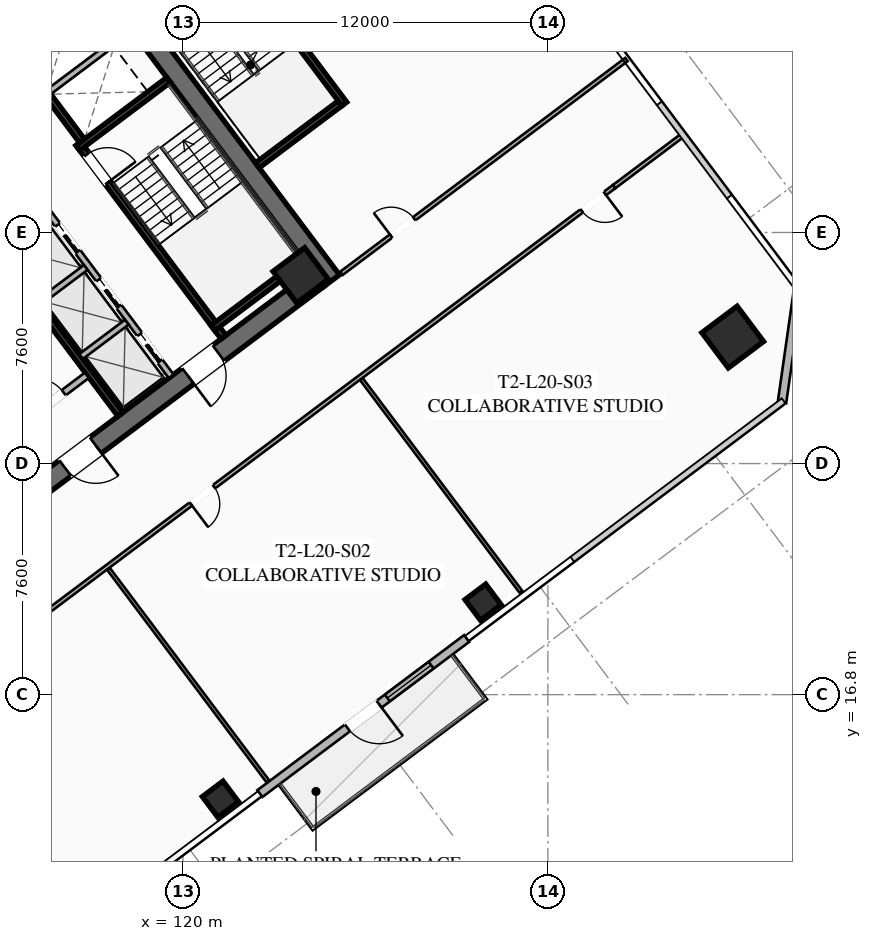
"""IFC4 building model, lengths in metres.
Left out: names, types, materials, properties, quantities, classifications, styles, units other than length and angle.
Written with IfcOpenShell. Run it as: python <this file> out.ifc"""

import sys

from ifc_helpers import new_model, si_unit, direction, frame, frame_2d, origin, origin_2d, place, context, subcontext, project, spatial, rectangle, hollow_rectangle, extrude, element, fill, save


model = new_model("IFC4")
c1 = context("Model", 3, precision=1e-05, world=origin(), true_north=direction((0.0, 1.0)))
c2 = subcontext(c1, "Body", "Model", "MODEL_VIEW")
j1 = project(units=[si_unit("LENGTHUNIT", "METRE"), si_unit("PLANEANGLEUNIT", "RADIAN")], contexts=[c1])
p1 = place(None, origin())
s1 = spatial("IfcSite", under=j1, at=p1, CompositionType="ELEMENT")
p2 = place(p1, origin())
s2 = spatial("IfcBuilding", under=s1, at=p2, CompositionType="ELEMENT")
p3 = place(p2, frame((0.0, 0.0, 77.85)))
s3 = spatial("IfcBuildingStorey", under=s2, at=p3, CompositionType="ELEMENT", Elevation=77.85)
p4 = place(p3, frame((115.524, 42.893, 0.0), z_axis=(0.0, 0.0, 1.0), x_axis=(0.600005007985, -0.799996243986, 0.0)))
e1 = element("IfcWall", 1, at=p4, inside=s3, PredefinedType="SHEAR", context=c2, shape_type="SweptSolid", body=[
    extrude(rectangle(XDim=15.6, YDim=0.65, at=frame_2d((7.8, 0.0))), origin(), (0.0, 0.0, 1.0), 3.55),
])
p5 = place(p3, frame((124.429, 30.478, 0.0), z_axis=(0.0, 0.0, 1.0), x_axis=(-0.799998028465, -0.600002628705, 0.0)))
e2 = element("IfcWall", 2, at=p5, inside=s3, PredefinedType="SHEAR", context=c2, shape_type="SweptSolid", body=[
    extrude(rectangle(XDim=14.86, YDim=0.65, at=frame_2d((7.43, 0.0))), origin(), (0.0, 0.0, 1.0), 3.55),
])
p6 = place(p5, frame((9.13, 0.0, 0.0)))
e3 = element("IfcOpeningElement", 3, at=p6, cuts=e2, PredefinedType="OPENING", context=c2, shape_type="SweptSolid", body=[
    extrude(rectangle(XDim=1.25, YDim=2.25, at=frame_2d((0.625, 1.125))), frame((0.0, 0.335, 0.0), z_axis=(0.0, -1.0, 0.0), x_axis=(1.0, 0.0, 0.0)), (0.0, 0.0, 1.0), 0.67),
])
p7 = place(p5, frame((4.08, 0.0, 0.0)))
e4 = element("IfcOpeningElement", 4, at=p7, cuts=e2, PredefinedType="OPENING", context=c2, shape_type="SweptSolid", body=[
    extrude(rectangle(XDim=1.25, YDim=2.25, at=frame_2d((0.625, 1.125))), frame((0.0, 0.335, 0.0), z_axis=(0.0, -1.0, 0.0), x_axis=(1.0, 0.0, 0.0)), (0.0, 0.0, 1.0), 0.67),
])
p8 = place(p3, frame((123.87, 30.59, 0.0), z_axis=(0.0, 0.0, 1.0), x_axis=(0.799999996291, 0.600000004945, 0.0)))
e5 = element("IfcColumn", 5, at=p8, inside=s3, PredefinedType="COLUMN", context=c2, shape_type="SweptSolid", body=[
    extrude(hollow_rectangle(XDim=1.3, YDim=1.3, WallThickness=0.05, at=origin_2d()), origin(), (0.0, 0.0, 1.0), 3.35),
])
p9 = place(p3, frame((138.08, 28.56, 0.0), z_axis=(0.0, 0.0, 1.0), x_axis=(0.799999996291, 0.600000004945, 0.0)))
e6 = element("IfcColumn", 6, at=p9, inside=s3, PredefinedType="COLUMN", context=c2, shape_type="SweptSolid", body=[
    extrude(hollow_rectangle(XDim=1.45, YDim=1.45, WallThickness=0.055, at=origin_2d()), origin(), (0.0, 0.0, 1.0), 3.35),
])
for number, where, z_axis, x_axis in (
    (7, (121.23, 13.36, 0.0), (0.0, 0.0, 1.0), (0.8, 0.6, 0.0)),
    (8, (129.87, 19.84, 0.0), (0.0, 0.0, 1.0), (0.8, 0.6, 0.0)),
):
    element("IfcColumn", number, at=place(p3, frame(where, z_axis=z_axis, x_axis=x_axis)), inside=s3, PredefinedType="COLUMN", context=c2, shape_type="SweptSolid", body=[
        extrude(hollow_rectangle(XDim=0.85, YDim=0.85, WallThickness=0.035, at=origin_2d()), origin(), (0.0, 0.0, 1.0), 3.35),
    ])
p10 = place(p3, frame((129.328, 18.646, 0.0), z_axis=(0.0, 0.0, 1.0), x_axis=(-0.799986212866, -0.600018382406, 0.0)))
e9 = element("IfcWall", 9, at=p10, inside=s3, PredefinedType="SOLIDWALL", context=c2, shape_type="SweptSolid", body=[
    extrude(rectangle(XDim=8.5, YDim=0.28, at=frame_2d((4.25, 0.0))), origin(), (0.0, 0.0, 1.0), 3.35),
])
p11 = place(p10, frame((3.6, 0.0, 0.0)))
e10 = element("IfcOpeningElement", 10, at=p11, cuts=e9, PredefinedType="OPENING", context=c2, shape_type="SweptSolid", body=[
    extrude(rectangle(XDim=1.3, YDim=2.15, at=frame_2d((0.65, 1.075))), frame((0.0, 0.15, 0.0), z_axis=(0.0, -1.0, 0.0), x_axis=(1.0, 0.0, 0.0)), (0.0, 0.0, 1.0), 0.3),
])
p12 = place(p10, frame((1.46, 0.0, 0.85)))
e11 = element("IfcOpeningElement", 11, at=p12, cuts=e9, PredefinedType="OPENING", context=c2, shape_type="SweptSolid", body=[
    extrude(rectangle(XDim=1.8, YDim=1.92, at=frame_2d((0.9, 0.96))), frame((0.0, 0.15, 0.0), z_axis=(0.0, -1.0, 0.0), x_axis=(1.0, 0.0, 0.0)), (0.0, 0.0, 1.0), 0.3),
])
p13 = place(p3, frame((140.24, 30.18, 0.0), z_axis=(0.0, 0.0, 1.0), x_axis=(-0.141430307517, -0.989948214866, 0.0)))
e12 = element("IfcWall", 12, at=p13, inside=s3, PredefinedType="SOLIDWALL", context=c2, shape_type="SweptSolid", body=[
    extrude(rectangle(XDim=3.818, YDim=0.28, at=frame_2d((1.909, 0.0))), origin(), (0.0, 0.0, 1.0), 3.35),
])
p14 = place(p3, frame((116.56, 34.92, 0.0), z_axis=(0.0, 0.0, 1.0), x_axis=(0.600009827119, -0.799992629566, 0.0)))
e13 = element("IfcWall", 13, at=p14, inside=s3, PredefinedType="SHEAR", context=c2, shape_type="SweptSolid", body=[
    extrude(rectangle(XDim=7.95, YDim=0.2, at=frame_2d((3.975, 0.0))), origin(), (0.0, 0.0, 1.0), 3.35),
])
p15 = place(p14, frame((0.45, 0.0, 0.0)))
e14 = element("IfcOpeningElement", 14, at=p15, cuts=e13, PredefinedType="OPENING", context=c2, shape_type="SweptSolid", body=[
    extrude(rectangle(XDim=1.15, YDim=2.2, at=frame_2d((0.575, 1.1))), frame((0.0, 0.11, 0.0), z_axis=(0.0, -1.0, 0.0), x_axis=(1.0, 0.0, 0.0)), (0.0, 0.0, 1.0), 0.22),
])
for number, where, z_axis, x_axis in (
    (15, (116.54, 34.78, 0.0), (0.0, 0.0, 1.0), (0.8, 0.6, 0.0)),
    (16, (120.98, 28.86, 0.0), (0.0, 0.0, 1.0), (0.8, 0.6, 0.0)),
):
    element("IfcWall", number, at=place(p3, frame(where, z_axis=z_axis, x_axis=x_axis)), inside=s3, PredefinedType="SHEAR", context=c2, shape_type="SweptSolid", body=[
        extrude(rectangle(XDim=3.73, YDim=0.2, at=frame_2d((1.865, 0.0))), origin(), (0.0, 0.0, 1.0), 3.35),
    ])
p16 = place(p3, frame((117.938, 26.016, 0.0), z_axis=(0.0, 0.0, 1.0), x_axis=(-0.600005463273, 0.799995902516, 0.0)))
e17 = element("IfcWall", 17, at=p16, inside=s3, PredefinedType="SHEAR", context=c2, shape_type="SweptSolid", body=[
    extrude(rectangle(XDim=14.3, YDim=0.2, at=frame_2d((7.15, 0.0))), origin(), (0.0, 0.0, 1.0), 3.35),
])
p17 = place(p3, frame((114.316, 25.412, 0.0), z_axis=(0.0, 0.0, 1.0), x_axis=(0.800018601094, 0.59997519774, 0.0)))
e18 = element("IfcWall", 18, at=p17, inside=s3, PredefinedType="SOLIDWALL", context=c2, shape_type="SweptSolid", body=[
    extrude(rectangle(XDim=3.15, YDim=0.22, at=frame_2d((1.575, 0.0))), origin(), (0.0, 0.0, 1.0), 2.703),
])
p18 = place(p17, frame((0.95, 0.0, 0.0)))
e19 = element("IfcOpeningElement", 19, at=p18, cuts=e18, PredefinedType="OPENING", context=c2, shape_type="SweptSolid", body=[
    extrude(rectangle(XDim=1.25, YDim=2.25, at=frame_2d((0.625, 1.125))), frame((0.0, 0.12, 0.0), z_axis=(0.0, -1.0, 0.0), x_axis=(1.0, 0.0, 0.0)), (0.0, 0.0, 1.0), 0.24),
])
p19 = place(p3, frame((112.87, 40.09, 0.0), z_axis=(0.0, 0.0, 1.0), x_axis=(0.599975393228, -0.800018454488, 0.0)))
e20 = element("IfcWall", 20, at=p19, inside=s3, PredefinedType="SHEAR", context=c2, shape_type="SweptSolid", body=[
    extrude(rectangle(XDim=6.35, YDim=0.2, at=frame_2d((3.175, 0.0))), origin(), (0.0, 0.0, 1.0), 3.35),
])
p20 = place(p3, frame((115.59, 36.63, 0.0), z_axis=(0.0, 0.0, 1.0), x_axis=(0.799973995579, 0.600034670996, 0.0)))
e21 = element("IfcWall", 21, at=p20, inside=s3, PredefinedType="SOLIDWALL", context=c2, shape_type="SweptSolid", body=[
    extrude(rectangle(XDim=3.38, YDim=0.2, at=frame_2d((1.69, 0.0))), origin(), (0.0, 0.0, 1.0), 3.35),
])
p21 = place(p3, frame((119.61, 27.27, 0.0), z_axis=(0.0, 0.0, 1.0), x_axis=(-0.600011488909, 0.79999138319, 0.0)))
e22 = element("IfcWall", 22, at=p21, inside=s3, PredefinedType="SOLIDWALL", context=c2, shape_type="SweptSolid", body=[
    extrude(rectangle(XDim=6.8, YDim=0.2, at=frame_2d((3.4, 0.0))), origin(), (0.0, 0.0, 1.0), 3.35),
])
p22 = place(p21, frame((0.625, 0.0, 0.0)))
e23 = element("IfcOpeningElement", 23, at=p22, cuts=e22, PredefinedType="OPENING", context=c2, shape_type="SweptSolid", body=[
    extrude(rectangle(XDim=1.1, YDim=2.2, at=frame_2d((0.55, 1.1))), frame((0.0, 0.11, 0.0), z_axis=(0.0, -1.0, 0.0), x_axis=(1.0, 0.0, 0.0)), (0.0, 0.0, 1.0), 0.22),
])
p23 = place(p21, frame((2.875, 0.0, 0.0)))
e24 = element("IfcOpeningElement", 24, at=p23, cuts=e22, PredefinedType="OPENING", context=c2, shape_type="SweptSolid", body=[
    extrude(rectangle(XDim=1.1, YDim=2.2, at=frame_2d((0.55, 1.1))), frame((0.0, 0.11, 0.0), z_axis=(0.0, -1.0, 0.0), x_axis=(1.0, 0.0, 0.0)), (0.0, 0.0, 1.0), 0.22),
])
p24 = place(p21, frame((5.125, 0.0, 0.0)))
e25 = element("IfcOpeningElement", 25, at=p24, cuts=e22, PredefinedType="OPENING", context=c2, shape_type="SweptSolid", body=[
    extrude(rectangle(XDim=1.1, YDim=2.2, at=frame_2d((0.55, 1.1))), frame((0.0, 0.11, 0.0), z_axis=(0.0, -1.0, 0.0), x_axis=(1.0, 0.0, 0.0)), (0.0, 0.0, 1.0), 0.22),
])
p25 = place(p3, frame((116.646, 27.922, 0.0), z_axis=(0.0, 0.0, 1.0), x_axis=(0.8, 0.6, 0.0)))
e26 = element("IfcWall", 26, at=p25, inside=s3, PredefinedType="SOLIDWALL", context=c2, shape_type="SweptSolid", body=[
    extrude(rectangle(XDim=1.88, YDim=0.2, at=frame_2d((0.94, 0.0))), origin(), (0.0, 0.0, 1.0), 3.35),
])
p26 = place(p3, frame((115.296, 29.722, 0.0), z_axis=(0.0, 0.0, 1.0), x_axis=(0.799984418148, 0.600020775241, 0.0)))
e27 = element("IfcWall", 27, at=p26, inside=s3, PredefinedType="SOLIDWALL", context=c2, shape_type="SweptSolid", body=[
    extrude(rectangle(XDim=1.88, YDim=0.2, at=frame_2d((0.94, 0.0))), origin(), (0.0, 0.0, 1.0), 3.35),
])
p27 = place(p3, frame((125.304, 36.228, 0.0), z_axis=(0.0, 0.0, 1.0), x_axis=(-0.59998851072, 0.800008616831, 0.0)))
e28 = element("IfcWall", 28, at=p27, inside=s3, PredefinedType="SHEAR", context=c2, shape_type="SweptSolid", body=[
    extrude(rectangle(XDim=6.8, YDim=0.2, at=frame_2d((3.4, 0.0))), origin(), (0.0, 0.0, 1.0), 3.35),
])
p28 = place(p3, frame((122.444, 34.208, 0.0), z_axis=(0.0, 0.0, 1.0), x_axis=(0.79999138319, 0.600011488909, 0.0)))
e29 = element("IfcWall", 29, at=p28, inside=s3, PredefinedType="SHEAR", context=c2, shape_type="SweptSolid", body=[
    extrude(rectangle(XDim=3.4, YDim=0.2, at=frame_2d((1.7, 0.0))), origin(), (0.0, 0.0, 1.0), 3.35),
])
p29 = place(p3, frame((98.516, 34.012, 0.0), z_axis=(0.0, 0.0, 1.0), x_axis=(0.8, 0.6, 0.0)))
e30 = element("IfcWall", 30, at=p29, inside=s3, PredefinedType="PARTITIONING", context=c2, shape_type="SweptSolid", body=[
    extrude(rectangle(XDim=28.23, YDim=0.135, at=frame_2d((14.115, 0.0))), origin(), (0.0, 0.0, 1.0), 2.703),
])
p30 = place(p29, frame((0.3, 0.0, 0.0)))
e31 = element("IfcOpeningElement", 31, at=p30, cuts=e30, PredefinedType="OPENING", context=c2, shape_type="SweptSolid", body=[
    extrude(rectangle(XDim=0.95, YDim=2.05, at=frame_2d((0.475, 1.025))), frame((0.0, 0.077, 0.0), z_axis=(0.0, -1.0, 0.0), x_axis=(1.0, 0.0, 0.0)), (0.0, 0.0, 1.0), 0.155),
])
p31 = place(p29, frame((11.004, 0.0, 0.0)))
e32 = element("IfcOpeningElement", 32, at=p31, cuts=e30, PredefinedType="OPENING", context=c2, shape_type="SweptSolid", body=[
    extrude(rectangle(XDim=0.95, YDim=2.05, at=frame_2d((0.475, 1.025))), frame((0.0, 0.077, 0.0), z_axis=(0.0, -1.0, 0.0), x_axis=(1.0, 0.0, 0.0)), (0.0, 0.0, 1.0), 0.155),
])
p32 = place(p29, frame((26.98, 0.0, 0.0)))
e33 = element("IfcOpeningElement", 33, at=p32, cuts=e30, PredefinedType="OPENING", context=c2, shape_type="SweptSolid", body=[
    extrude(rectangle(XDim=0.95, YDim=2.05, at=frame_2d((0.475, 1.025))), frame((0.0, 0.077, 0.0), z_axis=(0.0, -1.0, 0.0), x_axis=(1.0, 0.0, 0.0)), (0.0, 0.0, 1.0), 0.155),
])
p33 = place(p3, frame((134.18, 33.51, 0.0), z_axis=(0.0, 0.0, 1.0), x_axis=(-0.8, -0.6, 0.0)))
e34 = element("IfcWall", 34, at=p33, inside=s3, PredefinedType="PARTITIONING", context=c2, shape_type="SweptSolid", body=[
    extrude(rectangle(XDim=28.23, YDim=0.135, at=frame_2d((14.115, 0.0))), origin(), (0.0, 0.0, 1.0), 2.703),
])
p34 = place(p33, frame((26.9, 0.0, 0.0)))
e35 = element("IfcOpeningElement", 35, at=p34, cuts=e34, PredefinedType="OPENING", context=c2, shape_type="SweptSolid", body=[
    extrude(rectangle(XDim=0.95, YDim=2.05, at=frame_2d((0.475, 1.025))), frame((0.0, 0.077, 0.0), z_axis=(0.0, -1.0, 0.0), x_axis=(1.0, 0.0, 0.0)), (0.0, 0.0, 1.0), 0.155),
])
p35 = place(p33, frame((16.453, 0.0, 0.0)))
e36 = element("IfcOpeningElement", 36, at=p35, cuts=e34, PredefinedType="OPENING", context=c2, shape_type="SweptSolid", body=[
    extrude(rectangle(XDim=0.95, YDim=2.05, at=frame_2d((0.475, 1.025))), frame((0.0, 0.077, 0.0), z_axis=(0.0, -1.0, 0.0), x_axis=(1.0, 0.0, 0.0)), (0.0, 0.0, 1.0), 0.155),
])
p36 = place(p33, frame((0.38, 0.0, 0.0)))
e37 = element("IfcOpeningElement", 37, at=p36, cuts=e34, PredefinedType="OPENING", context=c2, shape_type="SweptSolid", body=[
    extrude(rectangle(XDim=0.95, YDim=2.05, at=frame_2d((0.475, 1.025))), frame((0.0, 0.077, 0.0), z_axis=(0.0, -1.0, 0.0), x_axis=(1.0, 0.0, 0.0)), (0.0, 0.0, 1.0), 0.155),
])
p37 = place(p3, frame((134.18, 33.51, 0.0), z_axis=(0.0, 0.0, 1.0), x_axis=(0.8000207031, 0.599972394874, 0.0)))
e38 = element("IfcWall", 38, at=p37, inside=s3, PredefinedType="PARTITIONING", context=c2, shape_type="SweptSolid", body=[
    extrude(rectangle(XDim=2.83, YDim=0.135, at=frame_2d((1.415, 0.0))), origin(), (0.0, 0.0, 1.0), 2.703),
])
for number, where, z_axis, x_axis in (
    (39, (122.798, 13.936, 0.0), (0.0, 0.0, 1.0), (-0.6, 0.8, 0.0)),
    (40, (131.118, 20.176, 0.0), (0.0, 0.0, 1.0), (-0.6, 0.8, 0.0)),
):
    element("IfcWall", number, at=place(p3, frame(where, z_axis=z_axis, x_axis=x_axis)), inside=s3, PredefinedType="PARTITIONING", context=c2, shape_type="SweptSolid", body=[
        extrude(rectangle(XDim=8.75, YDim=0.11, at=frame_2d((4.375, 0.0))), origin(), (0.0, 0.0, 1.0), 2.703),
    ])
p38 = place(p3, frame((125.208, 30.656, 0.0), z_axis=(0.0, 0.0, 1.0), x_axis=(0.8, 0.6, 0.0)))
e41 = element("IfcWall", 41, at=p38, inside=s3, PredefinedType="PARTITIONING", context=c2, shape_type="SweptSolid", body=[
    extrude(rectangle(XDim=11.72, YDim=0.135, at=frame_2d((5.86, 0.0))), origin(), (0.0, 0.0, 1.0), 2.703),
])
p39 = place(p38, frame((2.045, 0.0, 0.0)))
e42 = element("IfcOpeningElement", 42, at=p39, cuts=e41, PredefinedType="OPENING", context=c2, shape_type="SweptSolid", body=[
    extrude(rectangle(XDim=0.95, YDim=2.05, at=frame_2d((0.475, 1.025))), frame((0.0, 0.077, 0.0), z_axis=(0.0, -1.0, 0.0), x_axis=(1.0, 0.0, 0.0)), (0.0, 0.0, 1.0), 0.155),
])
p40 = place(p11, origin())
e43 = element("IfcDoor", 43, at=p40, inside=s3, OperationType="SINGLE_SWING_LEFT", PredefinedType="DOOR", context=c2, shape_type="SweptSolid", body=[
    extrude(rectangle(XDim=1.3, YDim=2.15, at=frame_2d((0.65, 1.075))), frame((0.0, 0.025, 0.0), z_axis=(0.0, -1.0, 0.0), x_axis=(1.0, 0.0, 0.0)), (0.0, 0.0, 1.0), 0.05),
])
fill(e10, e43)
p41 = place(p12, origin())
e44 = element("IfcWindow", 44, at=p41, inside=s3, PartitioningType="SINGLE_PANEL", PredefinedType="WINDOW", context=c2, shape_type="SweptSolid", body=[
    extrude(rectangle(XDim=1.8, YDim=1.92, at=frame_2d((0.9, 0.96))), frame((0.0, 0.03, 0.0), z_axis=(0.0, -1.0, 0.0), x_axis=(1.0, 0.0, 0.0)), (0.0, 0.0, 1.0), 0.06),
])
fill(e11, e44)
p42 = place(p6, origin())
e45 = element("IfcDoor", 45, at=p42, inside=s3, OperationType="SINGLE_SWING_LEFT", PredefinedType="DOOR", context=c2, shape_type="SweptSolid", body=[
    extrude(rectangle(XDim=1.25, YDim=2.25, at=frame_2d((0.625, 1.125))), frame((0.0, 0.025, 0.0), z_axis=(0.0, -1.0, 0.0), x_axis=(1.0, 0.0, 0.0)), (0.0, 0.0, 1.0), 0.05),
])
fill(e3, e45)
p43 = place(p7, origin())
e46 = element("IfcDoor", 46, at=p43, inside=s3, OperationType="SINGLE_SWING_RIGHT", PredefinedType="DOOR", context=c2, shape_type="SweptSolid", body=[
    extrude(rectangle(XDim=1.25, YDim=2.25, at=frame_2d((0.625, 1.125))), frame((0.0, 0.025, 0.0), z_axis=(0.0, -1.0, 0.0), x_axis=(1.0, 0.0, 0.0)), (0.0, 0.0, 1.0), 0.05),
])
fill(e4, e46)
p44 = place(p15, origin())
e47 = element("IfcDoor", 47, at=p44, inside=s3, OperationType="SINGLE_SWING_RIGHT", PredefinedType="DOOR", context=c2, shape_type="SweptSolid", body=[
    extrude(rectangle(XDim=1.15, YDim=2.2, at=frame_2d((0.575, 1.1))), frame((0.0, 0.025, 0.0), z_axis=(0.0, -1.0, 0.0), x_axis=(1.0, 0.0, 0.0)), (0.0, 0.0, 1.0), 0.05),
])
fill(e14, e47)
p45 = place(p18, origin())
e48 = element("IfcDoor", 48, at=p45, inside=s3, OperationType="SINGLE_SWING_LEFT", PredefinedType="DOOR", context=c2, shape_type="SweptSolid", body=[
    extrude(rectangle(XDim=1.25, YDim=2.25, at=frame_2d((0.625, 1.125))), frame((0.0, 0.025, 0.0), z_axis=(0.0, -1.0, 0.0), x_axis=(1.0, 0.0, 0.0)), (0.0, 0.0, 1.0), 0.05),
])
fill(e19, e48)
p46 = place(p35, origin())
e49 = element("IfcDoor", 49, at=p46, inside=s3, OperationType="SINGLE_SWING_RIGHT", PredefinedType="DOOR", context=c2, shape_type="SweptSolid", body=[
    extrude(rectangle(XDim=0.95, YDim=2.05, at=frame_2d((0.475, 1.025))), frame((0.0, 0.025, 0.0), z_axis=(0.0, -1.0, 0.0), x_axis=(1.0, 0.0, 0.0)), (0.0, 0.0, 1.0), 0.05),
])
fill(e36, e49)
p47 = place(p36, origin())
e50 = element("IfcDoor", 50, at=p47, inside=s3, OperationType="SINGLE_SWING_LEFT", PredefinedType="DOOR", context=c2, shape_type="SweptSolid", body=[
    extrude(rectangle(XDim=0.95, YDim=2.05, at=frame_2d((0.475, 1.025))), frame((0.0, 0.025, 0.0), z_axis=(0.0, -1.0, 0.0), x_axis=(1.0, 0.0, 0.0)), (0.0, 0.0, 1.0), 0.05),
])
fill(e37, e50)
p48 = place(p39, origin())
e51 = element("IfcDoor", 51, at=p48, inside=s3, OperationType="SINGLE_SWING_LEFT", PredefinedType="DOOR", context=c2, shape_type="SweptSolid", body=[
    extrude(rectangle(XDim=0.95, YDim=2.05, at=frame_2d((0.475, 1.025))), frame((0.0, 0.025, 0.0), z_axis=(0.0, -1.0, 0.0), x_axis=(1.0, 0.0, 0.0)), (0.0, 0.0, 1.0), 0.05),
])
fill(e42, e51)
p49 = place(p22, origin())
e52 = element("IfcDoor", 52, at=p49, inside=s3, OperationType="SLIDING_TO_LEFT", PredefinedType="DOOR", context=c2, shape_type="SweptSolid", body=[
    extrude(rectangle(XDim=1.1, YDim=2.2, at=frame_2d((0.55, 1.1))), frame((0.0, 0.025, 0.0), z_axis=(0.0, -1.0, 0.0), x_axis=(1.0, 0.0, 0.0)), (0.0, 0.0, 1.0), 0.05),
])
fill(e23, e52)
p50 = place(p23, origin())
e53 = element("IfcDoor", 53, at=p50, inside=s3, OperationType="SLIDING_TO_LEFT", PredefinedType="DOOR", context=c2, shape_type="SweptSolid", body=[
    extrude(rectangle(XDim=1.1, YDim=2.2, at=frame_2d((0.55, 1.1))), frame((0.0, 0.025, 0.0), z_axis=(0.0, -1.0, 0.0), x_axis=(1.0, 0.0, 0.0)), (0.0, 0.0, 1.0), 0.05),
])
fill(e24, e53)
p51 = place(p24, origin())
e54 = element("IfcDoor", 54, at=p51, inside=s3, OperationType="SLIDING_TO_LEFT", PredefinedType="DOOR", context=c2, shape_type="SweptSolid", body=[
    extrude(rectangle(XDim=1.1, YDim=2.2, at=frame_2d((0.55, 1.1))), frame((0.0, 0.025, 0.0), z_axis=(0.0, -1.0, 0.0), x_axis=(1.0, 0.0, 0.0)), (0.0, 0.0, 1.0), 0.05),
])
fill(e25, e54)
save(model, sys.argv[1])
